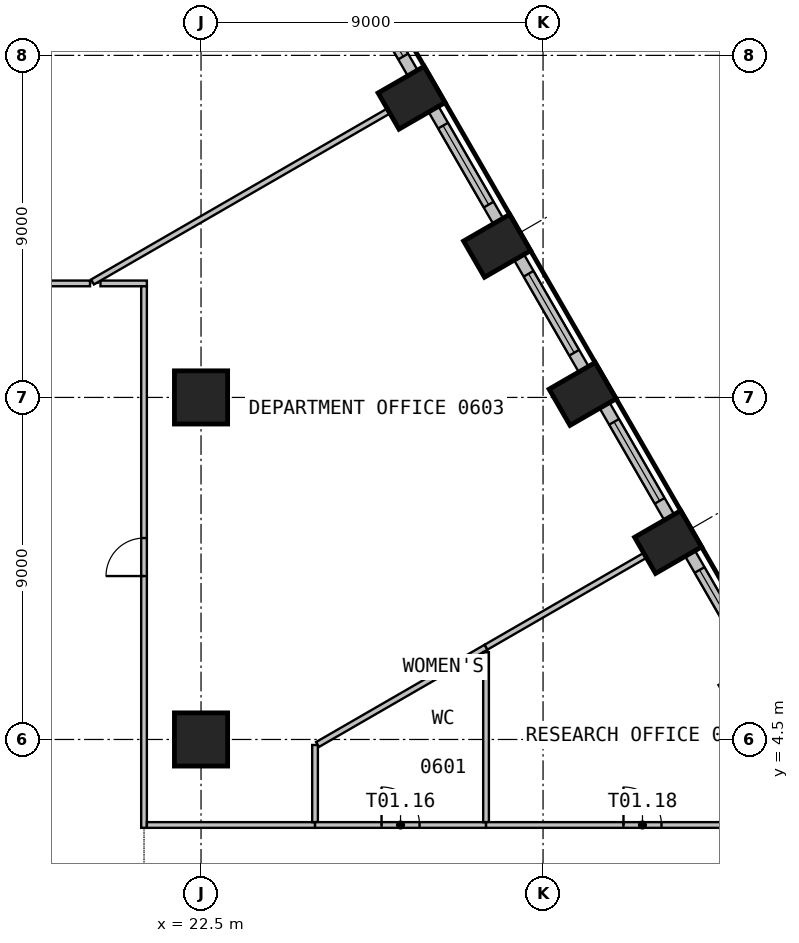
"""IFC4 building model, lengths in metres.
Left out: names, types, materials, properties, quantities, classifications, styles, units other than length and angle.
Written with IfcOpenShell. Run it as: python <this file> out.ifc"""

import sys

from ifc_helpers import new_model, si_unit, direction, frame, frame_2d, origin, origin_2d, place, context, subcontext, project, spatial, rectangle, circle, extrude, element, fill, save


model = new_model("IFC4")
c1 = context("Model", 3, precision=1e-05, world=origin(), true_north=direction((0.0, 1.0)))
c2 = subcontext(c1, "Body", "Model", "MODEL_VIEW")
j1 = project(units=[si_unit("LENGTHUNIT", "METRE"), si_unit("PLANEANGLEUNIT", "RADIAN")], contexts=[c1])
p1 = place(None, origin())
s1 = spatial("IfcSite", under=j1, at=p1, CompositionType="ELEMENT")
p2 = place(p1, origin())
s2 = spatial("IfcBuilding", under=s1, at=p2, CompositionType="ELEMENT")
p3 = place(p2, frame((0.0, 0.0, 30.0)))
s3 = spatial("IfcBuildingStorey", under=s2, at=p3, CompositionType="ELEMENT", Elevation=30.0)
for number, where, z_axis, x_axis in (
    (1, (34.791, 9.694, 0.0), (0.0, 0.0, 1.0), (-0.5, 0.866, 0.0)),
    (2, (32.541, 13.591, 0.0), (0.0, 0.0, 1.0), (-0.5, 0.866, 0.0)),
    (3, (30.291, 17.489, 0.0), (0.0, 0.0, 1.0), (-0.5, 0.866, 0.0)),
    (4, (28.041, 21.385, 0.0), (0.0, 0.0, 1.0), (-0.5, 0.866, 0.0)),
):
    element("IfcColumn", number, at=place(p3, frame(where, z_axis=z_axis, x_axis=x_axis)), inside=s3, PredefinedType="COLUMN", context=c2, shape_type="SweptSolid", body=[
        extrude(rectangle(XDim=1.1, YDim=1.4, at=origin_2d()), origin(), (0.0, 0.0, 1.0), 3.525),
    ])
for number, where, z_axis, x_axis in (
    (5, (22.5, 4.5, 0.0), (0.0, 0.0, 1.0), (1.0, 0.0, 0.0)),
    (6, (22.5, 13.5, 0.0), (0.0, 0.0, 1.0), (1.0, 0.0, 0.0)),
):
    element("IfcColumn", number, at=place(p3, frame(where, z_axis=z_axis, x_axis=x_axis)), inside=s3, PredefinedType="COLUMN", context=c2, shape_type="SweptSolid", body=[
        extrude(circle(Radius=0.7, at=origin_2d()), origin(), (0.0, 0.0, 1.0), 3.525),
    ])
p4 = place(p3, frame((37.069, 6.449, 0.0), z_axis=(0.0, 0.0, 1.0), x_axis=(-0.499993955907, 0.866028893315, 0.0)))
e7 = element("IfcWall", 7, at=p4, inside=s3, PredefinedType="SOLIDWALL", context=c2, shape_type="SweptSolid", body=[
    extrude(rectangle(XDim=3.399, YDim=0.3, at=frame_2d((1.699, 0.0))), origin(), (0.0, 0.0, 1.0), 3.525),
])
p5 = place(p4, frame((0.5, 0.0, 0.9)))
e8 = element("IfcOpeningElement", 8, at=p5, cuts=e7, PredefinedType="OPENING", context=c2, shape_type="SweptSolid", body=[
    extrude(rectangle(XDim=2.4, YDim=2.1, at=frame_2d((1.2, 1.05))), frame((0.0, 0.16, 0.0), z_axis=(0.0, -1.0, 0.0), x_axis=(1.0, 0.0, 0.0)), (0.0, 0.0, 1.0), 0.32),
])
p6 = place(p3, frame((34.819, 10.346, 0.0), z_axis=(0.0, 0.0, 1.0), x_axis=(-0.499993955907, 0.866028893315, 0.0)))
e9 = element("IfcWall", 9, at=p6, inside=s3, PredefinedType="SOLIDWALL", context=c2, shape_type="SweptSolid", body=[
    extrude(rectangle(XDim=3.399, YDim=0.3, at=frame_2d((1.699, 0.0))), origin(), (0.0, 0.0, 1.0), 3.525),
])
p7 = place(p6, frame((0.5, 0.0, 0.9)))
e10 = element("IfcOpeningElement", 10, at=p7, cuts=e9, PredefinedType="OPENING", context=c2, shape_type="SweptSolid", body=[
    extrude(rectangle(XDim=2.4, YDim=2.1, at=frame_2d((1.2, 1.05))), frame((0.0, 0.16, 0.0), z_axis=(0.0, -1.0, 0.0), x_axis=(1.0, 0.0, 0.0)), (0.0, 0.0, 1.0), 0.32),
])
p8 = place(p3, frame((32.569, 14.243, 0.0), z_axis=(0.0, 0.0, 1.0), x_axis=(-0.499993955907, 0.866028893315, 0.0)))
e11 = element("IfcWall", 11, at=p8, inside=s3, PredefinedType="SOLIDWALL", context=c2, shape_type="SweptSolid", body=[
    extrude(rectangle(XDim=3.399, YDim=0.3, at=frame_2d((1.699, 0.0))), origin(), (0.0, 0.0, 1.0), 3.525),
])
p9 = place(p8, frame((0.5, 0.0, 0.9)))
e12 = element("IfcOpeningElement", 12, at=p9, cuts=e11, PredefinedType="OPENING", context=c2, shape_type="SweptSolid", body=[
    extrude(rectangle(XDim=2.4, YDim=2.1, at=frame_2d((1.2, 1.05))), frame((0.0, 0.16, 0.0), z_axis=(0.0, -1.0, 0.0), x_axis=(1.0, 0.0, 0.0)), (0.0, 0.0, 1.0), 0.32),
])
p10 = place(p3, frame((30.319, 18.14, 0.0), z_axis=(0.0, 0.0, 1.0), x_axis=(-0.499993955907, 0.866028893315, 0.0)))
e13 = element("IfcWall", 13, at=p10, inside=s3, PredefinedType="SOLIDWALL", context=c2, shape_type="SweptSolid", body=[
    extrude(rectangle(XDim=3.399, YDim=0.3, at=frame_2d((1.699, 0.0))), origin(), (0.0, 0.0, 1.0), 3.525),
])
p11 = place(p10, frame((0.5, 0.0, 0.9)))
e14 = element("IfcOpeningElement", 14, at=p11, cuts=e13, PredefinedType="OPENING", context=c2, shape_type="SweptSolid", body=[
    extrude(rectangle(XDim=2.4, YDim=2.1, at=frame_2d((1.2, 1.05))), frame((0.0, 0.16, 0.0), z_axis=(0.0, -1.0, 0.0), x_axis=(1.0, 0.0, 0.0)), (0.0, 0.0, 1.0), 0.32),
])
p12 = place(p3, frame((28.069, 22.037, 0.0), z_axis=(0.0, 0.0, 1.0), x_axis=(-0.499993955907, 0.866028893315, 0.0)))
e15 = element("IfcWall", 15, at=p12, inside=s3, PredefinedType="SOLIDWALL", context=c2, shape_type="SweptSolid", body=[
    extrude(rectangle(XDim=3.399, YDim=0.3, at=frame_2d((1.699, 0.0))), origin(), (0.0, 0.0, 1.0), 3.525),
])
p13 = place(p12, frame((0.5, 0.0, 0.9)))
e16 = element("IfcOpeningElement", 16, at=p13, cuts=e15, PredefinedType="OPENING", context=c2, shape_type="SweptSolid", body=[
    extrude(rectangle(XDim=2.4, YDim=2.1, at=frame_2d((1.2, 1.05))), frame((0.0, 0.16, 0.0), z_axis=(0.0, -1.0, 0.0), x_axis=(1.0, 0.0, 0.0)), (0.0, 0.0, 1.0), 0.32),
])
p14 = place(p3, frame((19.579, 16.5, 0.0), z_axis=(0.0, 0.0, 1.0), x_axis=(-1.0, 0.0, 0.0)))
e17 = element("IfcWall", 17, at=p14, inside=s3, PredefinedType="PARTITIONING", context=c2, shape_type="SweptSolid", body=[
    extrude(rectangle(XDim=8.287, YDim=0.15, at=frame_2d((4.144, 0.0))), origin(), (0.0, 0.0, 1.0), 3.525),
])
p15 = place(p14, frame((3.644, 0.0, 0.0)))
e18 = element("IfcOpeningElement", 18, at=p15, cuts=e17, PredefinedType="OPENING", context=c2, shape_type="SweptSolid", body=[
    extrude(rectangle(XDim=1.0, YDim=2.1, at=frame_2d((0.5, 1.05))), frame((0.0, 0.085, 0.0), z_axis=(0.0, -1.0, 0.0), x_axis=(1.0, 0.0, 0.0)), (0.0, 0.0, 1.0), 0.17),
])
p16 = place(p3, frame((23.01, 28.393, 0.0), z_axis=(0.0, 0.0, 1.0), x_axis=(-0.707106781187, -0.707106781187, 0.0)))
e19 = element("IfcWall", 19, at=p16, inside=s3, PredefinedType="PARTITIONING", context=c2, shape_type="SweptSolid", body=[
    extrude(rectangle(XDim=16.745, YDim=0.15, at=frame_2d((8.373, 0.0))), origin(), (0.0, 0.0, 1.0), 3.525),
])
p17 = place(p3, frame((21.075, 16.5, 0.0), z_axis=(0.0, 0.0, 1.0), x_axis=(-1.0, 0.0, 0.0)))
e20 = element("IfcWall", 20, at=p17, inside=s3, PredefinedType="PARTITIONING", context=c2, shape_type="SweptSolid", body=[
    extrude(rectangle(XDim=1.221, YDim=0.15, at=frame_2d((0.61, 0.0))), origin(), (0.0, 0.0, 1.0), 3.525),
])
p18 = place(p3, frame((27.417, 21.026, 0.0), z_axis=(0.0, 0.0, 1.0), x_axis=(-0.866004853516, -0.500035592419, 0.0)))
e21 = element("IfcWall", 21, at=p18, inside=s3, PredefinedType="PARTITIONING", context=c2, shape_type="SweptSolid", body=[
    extrude(rectangle(XDim=8.976, YDim=0.15, at=frame_2d((4.488, 0.0))), origin(), (0.0, 0.0, 1.0), 3.525),
])
p19 = place(p3, frame((21.0, 2.175, 0.0), z_axis=(0.0, 0.0, 1.0), x_axis=(0.0, 1.0, 0.0)))
e22 = element("IfcWall", 22, at=p19, inside=s3, PredefinedType="PARTITIONING", context=c2, shape_type="SweptSolid", body=[
    extrude(rectangle(XDim=14.25, YDim=0.15, at=frame_2d((7.125, 0.0))), origin(), (0.0, 0.0, 1.0), 3.525),
])
p20 = place(p19, frame((6.625, 0.0, 0.0)))
e23 = element("IfcOpeningElement", 23, at=p20, cuts=e22, PredefinedType="OPENING", context=c2, shape_type="SweptSolid", body=[
    extrude(rectangle(XDim=1.0, YDim=2.1, at=frame_2d((0.5, 1.05))), frame((0.0, 0.085, 0.0), z_axis=(0.0, -1.0, 0.0), x_axis=(1.0, 0.0, 0.0)), (0.0, 0.0, 1.0), 0.17),
])
p21 = place(p3, frame((21.075, 2.25, 0.0), z_axis=(0.0, 0.0, 1.0), x_axis=(1.0, 0.0, 0.0)))
e24 = element("IfcWall", 24, at=p21, inside=s3, PredefinedType="PARTITIONING", context=c2, shape_type="SweptSolid", body=[
    extrude(rectangle(XDim=4.425, YDim=0.15, at=frame_2d((2.212, 0.0))), origin(), (0.0, 0.0, 1.0), 3.525),
])
p22 = place(p3, frame((25.5, 4.355, 0.0), z_axis=(0.0, 0.0, 1.0), x_axis=(0.0, -1.0, 0.0)))
e25 = element("IfcWall", 25, at=p22, inside=s3, PredefinedType="PARTITIONING", context=c2, shape_type="SweptSolid", body=[
    extrude(rectangle(XDim=2.03, YDim=0.15, at=frame_2d((1.015, 0.0))), origin(), (0.0, 0.0, 1.0), 3.525),
])
p23 = place(p3, frame((25.5, 2.25, 0.0), z_axis=(0.0, 0.0, 1.0), x_axis=(1.0, 0.0, 0.0)))
e26 = element("IfcWall", 26, at=p23, inside=s3, PredefinedType="PARTITIONING", context=c2, shape_type="SweptSolid", body=[
    extrude(rectangle(XDim=4.5, YDim=0.15, at=frame_2d((2.25, 0.0))), origin(), (0.0, 0.0, 1.0), 3.525),
])
p24 = place(p23, frame((1.75, 0.0, 0.0)))
e27 = element("IfcOpeningElement", 27, at=p24, cuts=e26, PredefinedType="OPENING", context=c2, shape_type="SweptSolid", body=[
    extrude(rectangle(XDim=1.0, YDim=2.1, at=frame_2d((0.5, 1.05))), frame((0.0, 0.085, 0.0), z_axis=(0.0, -1.0, 0.0), x_axis=(1.0, 0.0, 0.0)), (0.0, 0.0, 1.0), 0.17),
])
p25 = place(p3, frame((30.0, 6.928, 0.0), z_axis=(0.0, 0.0, 1.0), x_axis=(-0.866028396804, -0.499994815902, 0.0)))
e28 = element("IfcWall", 28, at=p25, inside=s3, PredefinedType="PARTITIONING", context=c2, shape_type="SweptSolid", body=[
    extrude(rectangle(XDim=5.121, YDim=0.15, at=frame_2d((2.561, 0.0))), origin(), (0.0, 0.0, 1.0), 3.525),
])
p26 = place(p3, frame((30.0, 6.798, 0.0), z_axis=(0.0, 0.0, 1.0), x_axis=(0.0, -1.0, 0.0)))
e29 = element("IfcWall", 29, at=p26, inside=s3, PredefinedType="PARTITIONING", context=c2, shape_type="SweptSolid", body=[
    extrude(rectangle(XDim=4.473, YDim=0.15, at=frame_2d((2.237, 0.0))), origin(), (0.0, 0.0, 1.0), 3.525),
])
p27 = place(p3, frame((30.0, 2.25, 0.0), z_axis=(0.0, 0.0, 1.0), x_axis=(1.0, 0.0, 0.0)))
e30 = element("IfcWall", 30, at=p27, inside=s3, PredefinedType="PARTITIONING", context=c2, shape_type="SweptSolid", body=[
    extrude(rectangle(XDim=8.233, YDim=0.15, at=frame_2d((4.116, 0.0))), origin(), (0.0, 0.0, 1.0), 3.525),
])
p28 = place(p27, frame((3.616, 0.0, 0.0)))
e31 = element("IfcOpeningElement", 31, at=p28, cuts=e30, PredefinedType="OPENING", context=c2, shape_type="SweptSolid", body=[
    extrude(rectangle(XDim=1.0, YDim=2.1, at=frame_2d((0.5, 1.05))), frame((0.0, 0.085, 0.0), z_axis=(0.0, -1.0, 0.0), x_axis=(1.0, 0.0, 0.0)), (0.0, 0.0, 1.0), 0.17),
])
p29 = place(p3, frame((34.167, 9.334, 0.0), z_axis=(0.0, 0.0, 1.0), x_axis=(-0.866011543723, -0.500024005562, 0.0)))
e32 = element("IfcWall", 32, at=p29, inside=s3, PredefinedType="PARTITIONING", context=c2, shape_type="SweptSolid", body=[
    extrude(rectangle(XDim=4.812, YDim=0.15, at=frame_2d((2.406, 0.0))), origin(), (0.0, 0.0, 1.0), 3.525),
])
p30 = place(p5, origin())
e33 = element("IfcWindow", 33, at=p30, inside=s3, PartitioningType="SINGLE_PANEL", PredefinedType="WINDOW", context=c2, shape_type="SweptSolid", body=[
    extrude(rectangle(XDim=2.4, YDim=2.1, at=frame_2d((1.2, 1.05))), frame((0.0, 0.03, 0.0), z_axis=(0.0, -1.0, 0.0), x_axis=(1.0, 0.0, 0.0)), (0.0, 0.0, 1.0), 0.06),
])
fill(e8, e33)
p31 = place(p7, origin())
e34 = element("IfcWindow", 34, at=p31, inside=s3, PartitioningType="SINGLE_PANEL", PredefinedType="WINDOW", context=c2, shape_type="SweptSolid", body=[
    extrude(rectangle(XDim=2.4, YDim=2.1, at=frame_2d((1.2, 1.05))), frame((0.0, 0.03, 0.0), z_axis=(0.0, -1.0, 0.0), x_axis=(1.0, 0.0, 0.0)), (0.0, 0.0, 1.0), 0.06),
])
fill(e10, e34)
p32 = place(p9, origin())
e35 = element("IfcWindow", 35, at=p32, inside=s3, PartitioningType="SINGLE_PANEL", PredefinedType="WINDOW", context=c2, shape_type="SweptSolid", body=[
    extrude(rectangle(XDim=2.4, YDim=2.1, at=frame_2d((1.2, 1.05))), frame((0.0, 0.03, 0.0), z_axis=(0.0, -1.0, 0.0), x_axis=(1.0, 0.0, 0.0)), (0.0, 0.0, 1.0), 0.06),
])
fill(e12, e35)
p33 = place(p11, origin())
e36 = element("IfcWindow", 36, at=p33, inside=s3, PartitioningType="SINGLE_PANEL", PredefinedType="WINDOW", context=c2, shape_type="SweptSolid", body=[
    extrude(rectangle(XDim=2.4, YDim=2.1, at=frame_2d((1.2, 1.05))), frame((0.0, 0.03, 0.0), z_axis=(0.0, -1.0, 0.0), x_axis=(1.0, 0.0, 0.0)), (0.0, 0.0, 1.0), 0.06),
])
fill(e14, e36)
p34 = place(p13, origin())
e37 = element("IfcWindow", 37, at=p34, inside=s3, PartitioningType="SINGLE_PANEL", PredefinedType="WINDOW", context=c2, shape_type="SweptSolid", body=[
    extrude(rectangle(XDim=2.4, YDim=2.1, at=frame_2d((1.2, 1.05))), frame((0.0, 0.03, 0.0), z_axis=(0.0, -1.0, 0.0), x_axis=(1.0, 0.0, 0.0)), (0.0, 0.0, 1.0), 0.06),
])
fill(e16, e37)
p35 = place(p20, origin())
e38 = element("IfcDoor", 38, at=p35, inside=s3, OperationType="SINGLE_SWING_LEFT", PredefinedType="DOOR", context=c2, shape_type="SweptSolid", body=[
    extrude(rectangle(XDim=1.0, YDim=2.1, at=frame_2d((0.5, 1.05))), frame((0.0, 0.025, 0.0), z_axis=(0.0, -1.0, 0.0), x_axis=(1.0, 0.0, 0.0)), (0.0, 0.0, 1.0), 0.05),
])
fill(e23, e38)
p36 = place(p24, origin())
e39 = element("IfcDoor", 39, at=p36, inside=s3, OperationType="SINGLE_SWING_RIGHT", PredefinedType="DOOR", context=c2, shape_type="SweptSolid", body=[
    extrude(rectangle(XDim=1.0, YDim=2.1, at=frame_2d((0.5, 1.05))), frame((0.0, 0.025, 0.0), z_axis=(0.0, -1.0, 0.0), x_axis=(1.0, 0.0, 0.0)), (0.0, 0.0, 1.0), 0.05),
])
fill(e27, e39)
p37 = place(p28, origin())
e40 = element("IfcDoor", 40, at=p37, inside=s3, OperationType="SINGLE_SWING_RIGHT", PredefinedType="DOOR", context=c2, shape_type="SweptSolid", body=[
    extrude(rectangle(XDim=1.0, YDim=2.1, at=frame_2d((0.5, 1.05))), frame((0.0, 0.025, 0.0), z_axis=(0.0, -1.0, 0.0), x_axis=(1.0, 0.0, 0.0)), (0.0, 0.0, 1.0), 0.05),
])
fill(e31, e40)
save(model, sys.argv[1])
